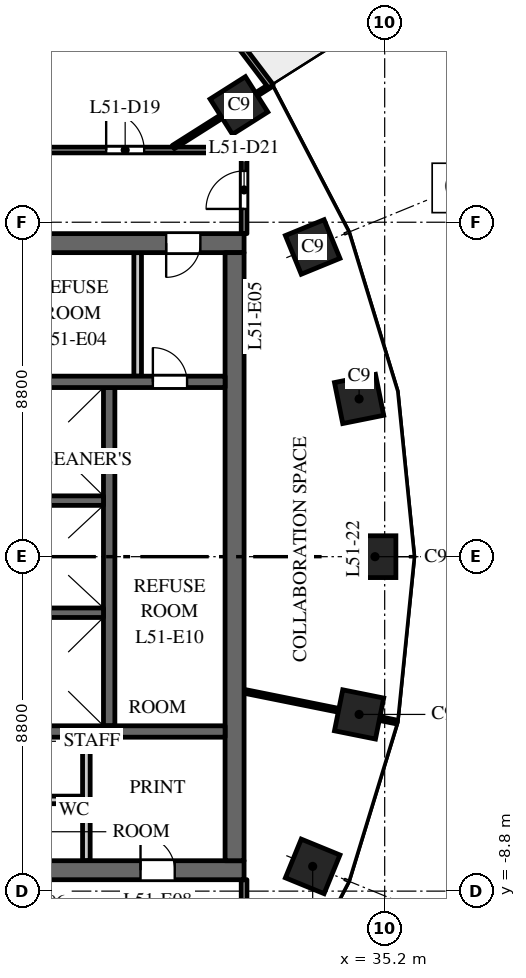
"""IFC4 building model, lengths in metres.
Left out: names, types, materials, properties, quantities, classifications, styles, units other than length and angle.
Written with IfcOpenShell. Run it as: python <this file> out.ifc"""

import sys

from ifc_helpers import new_model, si_unit, direction, frame, frame_2d, origin, origin_2d, place, context, subcontext, project, spatial, rectangle, extrude, element, fill, save


model = new_model("IFC4")
c1 = context("Model", 3, precision=1e-05, world=origin(), true_north=direction((0.0, 1.0)))
c2 = subcontext(c1, "Body", "Model", "MODEL_VIEW")
j1 = project(units=[si_unit("LENGTHUNIT", "METRE"), si_unit("PLANEANGLEUNIT", "RADIAN")], contexts=[c1])
p1 = place(None, origin())
s1 = spatial("IfcSite", under=j1, at=p1, CompositionType="ELEMENT")
p2 = place(p1, origin())
s2 = spatial("IfcBuilding", under=s1, at=p2, CompositionType="ELEMENT")
p3 = place(p2, frame((0.0, 0.0, 245.5)))
s3 = spatial("IfcBuildingStorey", under=s2, at=p3, CompositionType="ELEMENT", Elevation=245.5)
for number, where, z_axis, x_axis in (
    (1, (34.945, 0.0, 0.0), (0.0, 0.0, 1.0), (0.0, 1.0, 0.0)),
    (2, (34.527, 4.151, 0.0), (0.0, 0.0, 1.0), (-0.197, 0.98, 0.0)),
    (3, (33.305, 8.149, 0.0), (0.0, 0.0, 1.0), (-0.379, 0.925, 0.0)),
    (4, (31.365, 11.871, 0.0), (0.0, 0.0, 1.0), (-0.535, 0.845, 0.0)),
    (5, (33.305, -8.149, 0.0), (0.0, 0.0, 1.0), (0.379, 0.925, 0.0)),
    (6, (34.527, -4.151, 0.0), (0.0, 0.0, 1.0), (0.197, 0.98, 0.0)),
):
    element("IfcColumn", number, at=place(p3, frame(where, z_axis=z_axis, x_axis=x_axis)), inside=s3, PredefinedType="COLUMN", context=c2, shape_type="SweptSolid", body=[
        extrude(rectangle(XDim=1.1, YDim=1.1, at=origin_2d()), origin(), (0.0, 0.0, 1.0), 4.0),
    ])
p4 = place(p3, frame((16.5, 8.25, 0.0), z_axis=(0.0, 0.0, 1.0), x_axis=(1.0, 0.0, 0.0)))
e7 = element("IfcWall", 7, at=p4, inside=s3, PredefinedType="SHEAR", context=c2, shape_type="SweptSolid", body=[
    extrude(rectangle(XDim=15.0, YDim=0.5, at=frame_2d((7.5, 0.0))), origin(), (0.0, 0.0, 1.0), 3.7),
])
p5 = place(p4, frame((6.9, 0.0, 0.0)))
e8 = element("IfcOpeningElement", 8, at=p5, cuts=e7, PredefinedType="OPENING", context=c2, shape_type="SweptSolid", body=[
    extrude(rectangle(XDim=1.2, YDim=2.1, at=frame_2d((0.6, 1.05))), frame((0.0, 0.26, 0.0), z_axis=(0.0, -1.0, 0.0), x_axis=(1.0, 0.0, 0.0)), (0.0, 0.0, 1.0), 0.52),
])
p6 = place(p4, frame((12.95, 0.0, 0.0)))
e9 = element("IfcOpeningElement", 9, at=p6, cuts=e7, PredefinedType="OPENING", context=c2, shape_type="SweptSolid", body=[
    extrude(rectangle(XDim=0.9, YDim=2.1, at=frame_2d((0.45, 1.05))), frame((0.0, 0.26, 0.0), z_axis=(0.0, -1.0, 0.0), x_axis=(1.0, 0.0, 0.0)), (0.0, 0.0, 1.0), 0.52),
])
p7 = place(p3, frame((16.5, -8.25, 0.0), z_axis=(0.0, 0.0, 1.0), x_axis=(1.0, 0.0, 0.0)))
e10 = element("IfcWall", 10, at=p7, inside=s3, PredefinedType="SHEAR", context=c2, shape_type="SweptSolid", body=[
    extrude(rectangle(XDim=15.0, YDim=0.5, at=frame_2d((7.5, 0.0))), origin(), (0.0, 0.0, 1.0), 3.7),
])
p8 = place(p7, frame((6.9, 0.0, 0.0)))
e11 = element("IfcOpeningElement", 11, at=p8, cuts=e10, PredefinedType="OPENING", context=c2, shape_type="SweptSolid", body=[
    extrude(rectangle(XDim=1.2, YDim=2.1, at=frame_2d((0.6, 1.05))), frame((0.0, 0.26, 0.0), z_axis=(0.0, -1.0, 0.0), x_axis=(1.0, 0.0, 0.0)), (0.0, 0.0, 1.0), 0.52),
])
p9 = place(p7, frame((12.275, 0.0, 0.0)))
e12 = element("IfcOpeningElement", 12, at=p9, cuts=e10, PredefinedType="OPENING", context=c2, shape_type="SweptSolid", body=[
    extrude(rectangle(XDim=0.9, YDim=2.1, at=frame_2d((0.45, 1.05))), frame((0.0, 0.26, 0.0), z_axis=(0.0, -1.0, 0.0), x_axis=(1.0, 0.0, 0.0)), (0.0, 0.0, 1.0), 0.52),
])
p10 = place(p3, frame((27.95, -4.45, 0.0), z_axis=(0.0, 0.0, 1.0), x_axis=(0.0, 1.0, 0.0)))
e13 = element("IfcWall", 13, at=p10, inside=s3, PredefinedType="SHEAR", context=c2, shape_type="SweptSolid", body=[
    extrude(rectangle(XDim=8.9, YDim=0.3, at=frame_2d((4.45, 0.0))), origin(), (0.0, 0.0, 1.0), 3.7),
])
p11 = place(p3, frame((31.25, -8.0, 0.0), z_axis=(0.0, 0.0, 1.0), x_axis=(0.0, 1.0, 0.0)))
e14 = element("IfcWall", 14, at=p11, inside=s3, PredefinedType="SHEAR", context=c2, shape_type="SweptSolid", body=[
    extrude(rectangle(XDim=16.0, YDim=0.5, at=frame_2d((8.0, 0.0))), origin(), (0.0, 0.0, 1.0), 3.7),
])
p12 = place(p3, frame((24.9, 4.6, 0.0), z_axis=(0.0, 0.0, 1.0), x_axis=(1.0, 0.0, 0.0)))
e15 = element("IfcWall", 15, at=p12, inside=s3, PredefinedType="SHEAR", context=c2, shape_type="SweptSolid", body=[
    extrude(rectangle(XDim=6.1, YDim=0.3, at=frame_2d((3.05, 0.0))), origin(), (0.0, 0.0, 1.0), 3.7),
])
p13 = place(p12, frame((4.2, 0.0, 0.0)))
e16 = element("IfcOpeningElement", 16, at=p13, cuts=e15, PredefinedType="OPENING", context=c2, shape_type="SweptSolid", body=[
    extrude(rectangle(XDim=0.9, YDim=2.1, at=frame_2d((0.45, 1.05))), frame((0.0, 0.16, 0.0), z_axis=(0.0, -1.0, 0.0), x_axis=(1.0, 0.0, 0.0)), (0.0, 0.0, 1.0), 0.32),
])
for number, where, z_axis, x_axis in (
    (17, (28.7, 4.75, 0.0), (0.0, 0.0, 1.0), (0.0, 1.0, 0.0)),
    (18, (27.35, -8.0, 0.0), (0.0, 0.0, 1.0), (0.0, 1.0, 0.0)),
):
    element("IfcWall", number, at=place(p3, frame(where, z_axis=z_axis, x_axis=x_axis)), inside=s3, PredefinedType="PARTITIONING", context=c2, shape_type="SweptSolid", body=[
        extrude(rectangle(XDim=3.25, YDim=0.2, at=frame_2d((1.625, 0.0))), origin(), (0.0, 0.0, 1.0), 3.7),
    ])
p14 = place(p3, frame((24.9, -6.4, 0.0), z_axis=(0.0, 0.0, 1.0), x_axis=(1.0, 0.0, 0.0)))
e19 = element("IfcWall", 19, at=p14, inside=s3, PredefinedType="PARTITIONING", context=c2, shape_type="SweptSolid", body=[
    extrude(rectangle(XDim=2.35, YDim=0.2, at=frame_2d((1.175, 0.0))), origin(), (0.0, 0.0, 1.0), 3.7),
])
p15 = place(p3, frame((24.9, -4.6, 0.0), z_axis=(0.0, 0.0, 1.0), x_axis=(1.0, 0.0, 0.0)))
e20 = element("IfcWall", 20, at=p15, inside=s3, PredefinedType="SHEAR", context=c2, shape_type="SweptSolid", body=[
    extrude(rectangle(XDim=6.1, YDim=0.3, at=frame_2d((3.05, 0.0))), origin(), (0.0, 0.0, 1.0), 3.7),
])
for number, where, z_axis, x_axis in (
    (21, (24.9, -1.475, 0.0), (0.0, 0.0, 1.0), (1.0, 0.0, 0.0)),
    (22, (24.9, 1.475, 0.0), (0.0, 0.0, 1.0), (1.0, 0.0, 0.0)),
):
    element("IfcWall", number, at=place(p3, frame(where, z_axis=z_axis, x_axis=x_axis)), inside=s3, PredefinedType="SHEAR", context=c2, shape_type="SweptSolid", body=[
        extrude(rectangle(XDim=2.9, YDim=0.25, at=frame_2d((1.45, 0.0))), origin(), (0.0, 0.0, 1.0), 3.7),
    ])
p16 = place(p3, frame((32.208, 12.374, 0.0), z_axis=(0.0, 0.0, 1.0), x_axis=(-0.604045763106, 0.796949632081, 0.0)))
e23 = element("IfcWall", 23, at=p16, inside=s3, PredefinedType="STANDARD", context=c2, shape_type="SweptSolid", body=[
    extrude(rectangle(XDim=4.423, YDim=0.15, at=frame_2d((2.212, 0.0))), origin(), (0.0, 0.0, 1.0), 3.7),
])
p17 = place(p16, frame((1.712, 0.0, 0.0)))
e24 = element("IfcOpeningElement", 24, at=p17, cuts=e23, PredefinedType="OPENING", context=c2, shape_type="SweptSolid", body=[
    extrude(rectangle(XDim=1.0, YDim=2.4, at=frame_2d((0.5, 1.2))), frame((0.0, 0.085, 0.0), z_axis=(0.0, -1.0, 0.0), x_axis=(1.0, 0.0, 0.0)), (0.0, 0.0, 1.0), 0.17),
])
p18 = place(p3, frame((16.5, 10.7, 0.0), z_axis=(0.0, 0.0, 1.0), x_axis=(1.0, 0.0, 0.0)))
e25 = element("IfcWall", 25, at=p18, inside=s3, PredefinedType="PARTITIONING", context=c2, shape_type="SweptSolid", body=[
    extrude(rectangle(XDim=15.0, YDim=0.15, at=frame_2d((7.5, 0.0))), origin(), (0.0, 0.0, 1.0), 2.75),
])
p19 = place(p18, frame((11.371, 0.0, 0.0)))
e26 = element("IfcOpeningElement", 26, at=p19, cuts=e25, PredefinedType="OPENING", context=c2, shape_type="SweptSolid", body=[
    extrude(rectangle(XDim=1.0, YDim=2.1, at=frame_2d((0.5, 1.05))), frame((0.0, 0.085, 0.0), z_axis=(0.0, -1.0, 0.0), x_axis=(1.0, 0.0, 0.0)), (0.0, 0.0, 1.0), 0.17),
])
p20 = place(p3, frame((29.637, 10.777, 0.0), z_axis=(0.0, 0.0, 1.0), x_axis=(0.844810627195, 0.535065420467, 0.0)))
e27 = element("IfcWall", 27, at=p20, inside=s3, PredefinedType="PARTITIONING", context=c2, shape_type="SweptSolid", body=[
    extrude(rectangle(XDim=3.048, YDim=0.1, at=frame_2d((1.524, 0.0))), origin(), (0.0, 0.0, 1.0), 3.0),
])
p21 = place(p3, frame((31.5, -10.7, 0.0), z_axis=(0.0, 0.0, 1.0), x_axis=(0.0, 1.0, 0.0)))
e28 = element("IfcWall", 28, at=p21, inside=s3, PredefinedType="PARTITIONING", context=c2, shape_type="SweptSolid", body=[
    extrude(rectangle(XDim=2.2, YDim=0.15, at=frame_2d((1.1, 0.0))), origin(), (0.0, 0.0, 1.0), 3.0),
])
p22 = place(p3, frame((31.5, -3.542, 0.0), z_axis=(0.0, 0.0, 1.0), x_axis=(0.980357474535, -0.197228857227, 0.0)))
e29 = element("IfcWall", 29, at=p22, inside=s3, PredefinedType="PARTITIONING", context=c2, shape_type="SweptSolid", body=[
    extrude(rectangle(XDim=4.092, YDim=0.1, at=frame_2d((2.046, 0.0))), origin(), (0.0, 0.0, 1.0), 3.0),
])
p23 = place(p3, frame((31.5, 8.5, 0.0), z_axis=(0.0, 0.0, 1.0), x_axis=(0.0, 1.0, 0.0)))
e30 = element("IfcWall", 30, at=p23, inside=s3, PredefinedType="PARTITIONING", context=c2, shape_type="SweptSolid", body=[
    extrude(rectangle(XDim=2.2, YDim=0.15, at=frame_2d((1.1, 0.0))), origin(), (0.0, 0.0, 1.0), 3.0),
])
p24 = place(p23, frame((0.65, 0.0, 0.0)))
e31 = element("IfcOpeningElement", 31, at=p24, cuts=e30, PredefinedType="OPENING", context=c2, shape_type="SweptSolid", body=[
    extrude(rectangle(XDim=1.0, YDim=2.1, at=frame_2d((0.5, 1.05))), frame((0.0, 0.085, 0.0), z_axis=(0.0, -1.0, 0.0), x_axis=(1.0, 0.0, 0.0)), (0.0, 0.0, 1.0), 0.17),
])
p25 = place(p6, origin())
e32 = element("IfcDoor", 32, at=p25, inside=s3, OperationType="SINGLE_SWING_LEFT", PredefinedType="DOOR", context=c2, shape_type="SweptSolid", body=[
    extrude(rectangle(XDim=0.9, YDim=2.1, at=frame_2d((0.45, 1.05))), frame((0.0, 0.025, 0.0), z_axis=(0.0, -1.0, 0.0), x_axis=(1.0, 0.0, 0.0)), (0.0, 0.0, 1.0), 0.05),
])
fill(e9, e32)
p26 = place(p9, origin())
e33 = element("IfcDoor", 33, at=p26, inside=s3, OperationType="SINGLE_SWING_RIGHT", PredefinedType="DOOR", context=c2, shape_type="SweptSolid", body=[
    extrude(rectangle(XDim=0.9, YDim=2.1, at=frame_2d((0.45, 1.05))), frame((0.0, 0.025, 0.0), z_axis=(0.0, -1.0, 0.0), x_axis=(1.0, 0.0, 0.0)), (0.0, 0.0, 1.0), 0.05),
])
fill(e12, e33)
p27 = place(p13, origin())
e34 = element("IfcDoor", 34, at=p27, inside=s3, OperationType="SINGLE_SWING_RIGHT", PredefinedType="DOOR", context=c2, shape_type="SweptSolid", body=[
    extrude(rectangle(XDim=0.9, YDim=2.1, at=frame_2d((0.45, 1.05))), frame((0.0, 0.025, 0.0), z_axis=(0.0, -1.0, 0.0), x_axis=(1.0, 0.0, 0.0)), (0.0, 0.0, 1.0), 0.05),
])
fill(e16, e34)
p28 = place(p19, origin())
e35 = element("IfcDoor", 35, at=p28, inside=s3, OperationType="SINGLE_SWING_LEFT", PredefinedType="DOOR", context=c2, shape_type="SweptSolid", body=[
    extrude(rectangle(XDim=1.0, YDim=2.1, at=frame_2d((0.5, 1.05))), frame((0.0, 0.025, 0.0), z_axis=(0.0, -1.0, 0.0), x_axis=(1.0, 0.0, 0.0)), (0.0, 0.0, 1.0), 0.05),
])
fill(e26, e35)
p29 = place(p24, origin())
e36 = element("IfcDoor", 36, at=p29, inside=s3, OperationType="SINGLE_SWING_LEFT", PredefinedType="DOOR", context=c2, shape_type="SweptSolid", body=[
    extrude(rectangle(XDim=1.0, YDim=2.1, at=frame_2d((0.5, 1.05))), frame((0.0, 0.025, 0.0), z_axis=(0.0, -1.0, 0.0), x_axis=(1.0, 0.0, 0.0)), (0.0, 0.0, 1.0), 0.05),
])
fill(e31, e36)
save(model, sys.argv[1])
